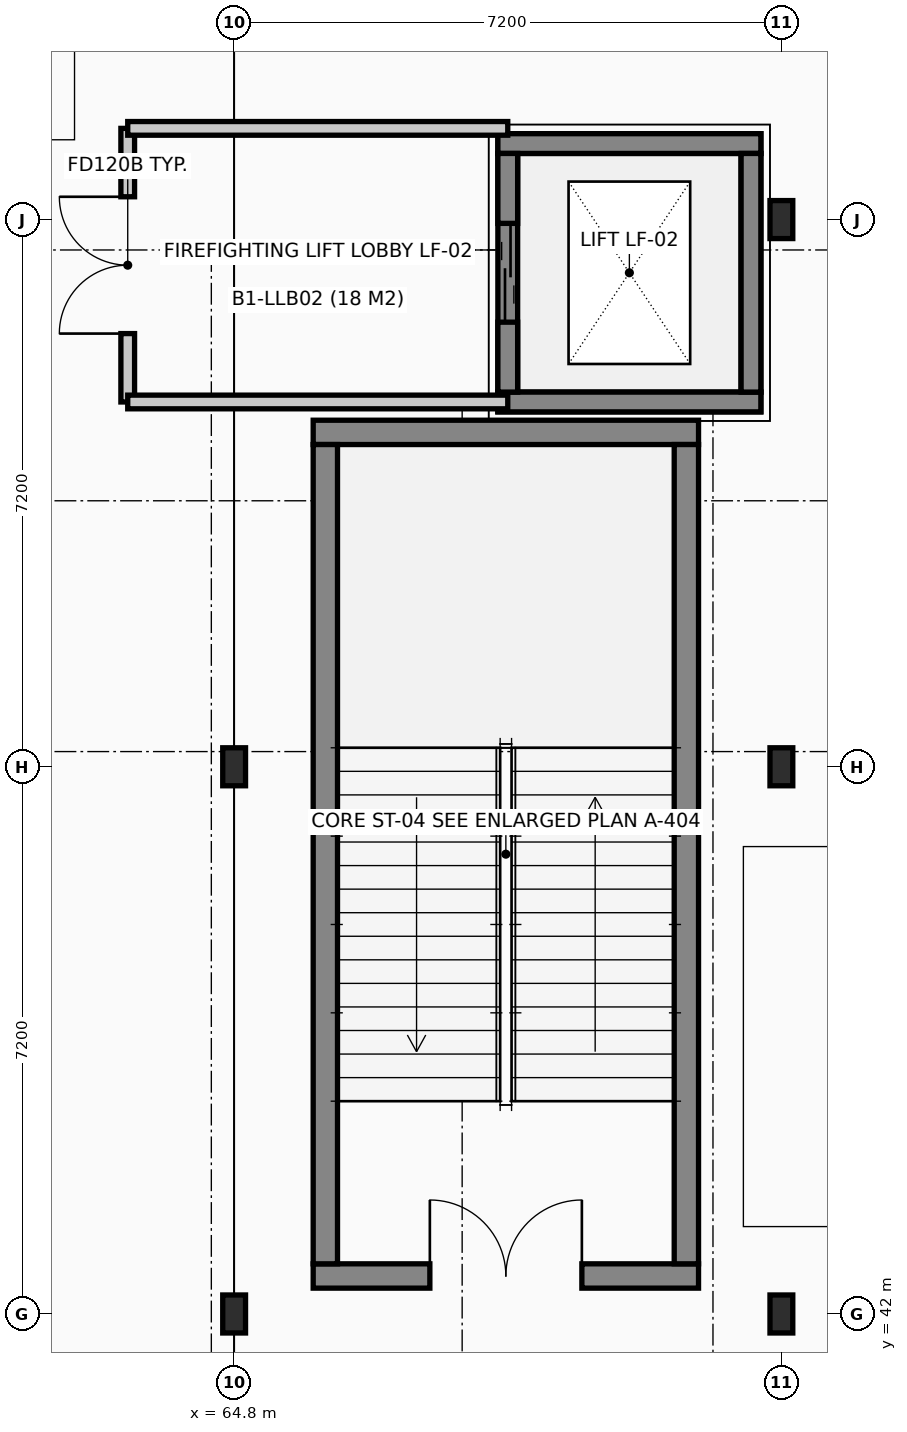
"""IFC4 building model, lengths in metres.
Left out: names, types, materials, properties, quantities, classifications, styles, units other than length and angle.
Written with IfcOpenShell. Run it as: python <this file> out.ifc"""

import sys

from ifc_helpers import new_model, si_unit, direction, frame, frame_2d, origin, origin_2d, place, context, subcontext, project, spatial, rectangle, i_section, extrude, element, fill, save


model = new_model("IFC4")
c1 = context("Model", 3, precision=1e-05, world=origin(), true_north=direction((0.0, 1.0)))
c2 = subcontext(c1, "Body", "Model", "MODEL_VIEW")
j1 = project(units=[si_unit("LENGTHUNIT", "METRE"), si_unit("PLANEANGLEUNIT", "RADIAN")], contexts=[c1])
p1 = place(None, origin())
s1 = spatial("IfcSite", under=j1, at=p1, CompositionType="ELEMENT")
p2 = place(p1, origin())
s2 = spatial("IfcBuilding", under=s1, at=p2, CompositionType="ELEMENT")
p3 = place(p2, frame((0.0, 0.0, -4.8)))
s3 = spatial("IfcBuildingStorey", under=s2, at=p3, CompositionType="ELEMENT", Elevation=-4.8)
for number, where, z_axis, x_axis in (
    (1, (64.8, 42.0, 0.0), (0.0, 0.0, 1.0), (1.0, 0.0, 0.0)),
    (2, (64.8, 49.2, 0.0), (0.0, 0.0, 1.0), (1.0, 0.0, 0.0)),
    (3, (72.0, 42.0, 0.0), (0.0, 0.0, 1.0), (1.0, 0.0, 0.0)),
    (4, (72.0, 49.2, 0.0), (0.0, 0.0, 1.0), (1.0, 0.0, 0.0)),
    (5, (72.0, 56.4, 0.0), (0.0, 0.0, 1.0), (1.0, 0.0, 0.0)),
):
    element("IfcColumn", number, at=place(p3, frame(where, z_axis=z_axis, x_axis=x_axis)), inside=s3, PredefinedType="COLUMN", context=c2, shape_type="SweptSolid", body=[
        extrude(i_section(OverallWidth=0.3, OverallDepth=0.5, WebThickness=0.014, FlangeThickness=0.028, at=origin_2d()), origin(), (0.0, 0.0, 1.0), 4.8),
    ])
p4 = place(p3, frame((65.84, 42.5, 0.0), z_axis=(0.0, 0.0, 1.0), x_axis=(1.0, 0.0, 0.0)))
e6 = element("IfcWall", 6, at=p4, inside=s3, PredefinedType="SHEAR", context=c2, shape_type="SweptSolid", body=[
    extrude(rectangle(XDim=5.07, YDim=0.32, at=frame_2d((2.535, 0.0))), origin(), (0.0, 0.0, 1.0), 4.55),
])
p5 = place(p4, frame((1.535, 0.0, 0.0)))
e7 = element("IfcOpeningElement", 7, at=p5, cuts=e6, PredefinedType="OPENING", context=c2, shape_type="SweptSolid", body=[
    extrude(rectangle(XDim=2.0, YDim=2.15, at=frame_2d((1.0, 1.075))), frame((0.0, 0.17, 0.0), z_axis=(0.0, -1.0, 0.0), x_axis=(1.0, 0.0, 0.0)), (0.0, 0.0, 1.0), 0.34),
])
p6 = place(p3, frame((65.84, 53.6, 0.0), z_axis=(0.0, 0.0, 1.0), x_axis=(1.0, 0.0, 0.0)))
e8 = element("IfcWall", 8, at=p6, inside=s3, PredefinedType="SHEAR", context=c2, shape_type="SweptSolid", body=[
    extrude(rectangle(XDim=5.07, YDim=0.32, at=frame_2d((2.535, 0.0))), origin(), (0.0, 0.0, 1.0), 4.55),
])
for number, where, z_axis, x_axis in (
    (9, (66.0, 42.66, 0.0), (0.0, 0.0, 1.0), (0.0, 1.0, 0.0)),
    (10, (70.75, 42.66, 0.0), (0.0, 0.0, 1.0), (0.0, 1.0, 0.0)),
):
    element("IfcWall", number, at=place(p3, frame(where, z_axis=z_axis, x_axis=x_axis)), inside=s3, PredefinedType="SHEAR", context=c2, shape_type="SweptSolid", body=[
        extrude(rectangle(XDim=10.78, YDim=0.32, at=frame_2d((5.39, 0.0))), origin(), (0.0, 0.0, 1.0), 4.55),
    ])
for number, where, z_axis, x_axis in (
    (11, (68.27, 54.0, -1.5), (0.0, 0.0, 1.0), (1.0, 0.0, 0.0)),
    (12, (68.27, 57.4, -1.5), (0.0, 0.0, 1.0), (1.0, 0.0, 0.0)),
):
    element("IfcWall", number, at=place(p3, frame(where, z_axis=z_axis, x_axis=x_axis)), inside=s3, PredefinedType="SHEAR", context=c2, shape_type="SweptSolid", body=[
        extrude(rectangle(XDim=3.46, YDim=0.26, at=frame_2d((1.73, 0.0))), origin(), (0.0, 0.0, 1.0), 1.5),
    ])
for number, where, z_axis, x_axis in (
    (13, (68.4, 54.13, -1.5), (0.0, 0.0, 1.0), (0.0, 1.0, 0.0)),
    (14, (71.6, 54.13, -1.5), (0.0, 0.0, 1.0), (0.0, 1.0, 0.0)),
):
    element("IfcWall", number, at=place(p3, frame(where, z_axis=z_axis, x_axis=x_axis)), inside=s3, PredefinedType="SHEAR", context=c2, shape_type="SweptSolid", body=[
        extrude(rectangle(XDim=3.14, YDim=0.26, at=frame_2d((1.57, 0.0))), origin(), (0.0, 0.0, 1.0), 1.5),
    ])
for number, where, z_axis, x_axis in (
    (15, (68.27, 54.0, 0.0), (0.0, 0.0, 1.0), (1.0, 0.0, 0.0)),
    (16, (68.27, 57.4, 0.0), (0.0, 0.0, 1.0), (1.0, 0.0, 0.0)),
):
    element("IfcWall", number, at=place(p3, frame(where, z_axis=z_axis, x_axis=x_axis)), inside=s3, PredefinedType="SHEAR", context=c2, shape_type="SweptSolid", body=[
        extrude(rectangle(XDim=3.46, YDim=0.26, at=frame_2d((1.73, 0.0))), origin(), (0.0, 0.0, 1.0), 4.55),
    ])
p7 = place(p3, frame((68.4, 54.13, 0.0), z_axis=(0.0, 0.0, 1.0), x_axis=(0.0, 1.0, 0.0)))
e17 = element("IfcWall", 17, at=p7, inside=s3, PredefinedType="SHEAR", context=c2, shape_type="SweptSolid", body=[
    extrude(rectangle(XDim=3.14, YDim=0.26, at=frame_2d((1.57, 0.0))), origin(), (0.0, 0.0, 1.0), 4.55),
])
p8 = place(p7, frame((0.92, 0.0, 0.0)))
e18 = element("IfcOpeningElement", 18, at=p8, cuts=e17, PredefinedType="OPENING", context=c2, shape_type="SweptSolid", body=[
    extrude(rectangle(XDim=1.3, YDim=2.2, at=frame_2d((0.65, 1.1))), frame((0.0, 0.14, 0.0), z_axis=(0.0, -1.0, 0.0), x_axis=(1.0, 0.0, 0.0)), (0.0, 0.0, 1.0), 0.28),
])
p9 = place(p3, frame((71.6, 54.13, 0.0), z_axis=(0.0, 0.0, 1.0), x_axis=(0.0, 1.0, 0.0)))
e19 = element("IfcWall", 19, at=p9, inside=s3, PredefinedType="SHEAR", context=c2, shape_type="SweptSolid", body=[
    extrude(rectangle(XDim=3.14, YDim=0.26, at=frame_2d((1.57, 0.0))), origin(), (0.0, 0.0, 1.0), 4.55),
])
p10 = place(p3, frame((63.4, 54.0, 0.0), z_axis=(0.0, 0.0, 1.0), x_axis=(0.0, 1.0, 0.0)))
e20 = element("IfcWall", 20, at=p10, inside=s3, PredefinedType="PARTITIONING", context=c2, shape_type="SweptSolid", body=[
    extrude(rectangle(XDim=3.6, YDim=0.18, at=frame_2d((1.8, 0.0))), origin(), (0.0, 0.0, 1.0), 4.535),
])
p11 = place(p10, frame((0.9, 0.0, 0.0)))
e21 = element("IfcOpeningElement", 21, at=p11, cuts=e20, PredefinedType="OPENING", context=c2, shape_type="SweptSolid", body=[
    extrude(rectangle(XDim=1.8, YDim=2.15, at=frame_2d((0.9, 1.075))), frame((0.0, 0.1, 0.0), z_axis=(0.0, -1.0, 0.0), x_axis=(1.0, 0.0, 0.0)), (0.0, 0.0, 1.0), 0.2),
])
for number, where, z_axis, x_axis in (
    (22, (63.4, 54.0, 0.0), (0.0, 0.0, 1.0), (1.0, 0.0, 0.0)),
    (23, (63.4, 57.6, 0.0), (0.0, 0.0, 1.0), (1.0, 0.0, 0.0)),
):
    element("IfcWall", number, at=place(p3, frame(where, z_axis=z_axis, x_axis=x_axis)), inside=s3, PredefinedType="PARTITIONING", context=c2, shape_type="SweptSolid", body=[
        extrude(rectangle(XDim=5.0, YDim=0.18, at=frame_2d((2.5, 0.0))), origin(), (0.0, 0.0, 1.0), 4.535),
    ])
p12 = place(p5, origin())
e24 = element("IfcDoor", 24, at=p12, inside=s3, OperationType="DOUBLE_DOOR_SINGLE_SWING", PredefinedType="DOOR", context=c2, shape_type="SweptSolid", body=[
    extrude(rectangle(XDim=2.0, YDim=2.15, at=frame_2d((1.0, 1.075))), frame((0.0, 0.025, 0.0), z_axis=(0.0, -1.0, 0.0), x_axis=(1.0, 0.0, 0.0)), (0.0, 0.0, 1.0), 0.05),
])
fill(e7, e24)
p13 = place(p8, origin())
e25 = element("IfcDoor", 25, at=p13, inside=s3, OperationType="DOUBLE_DOOR_SLIDING", PredefinedType="DOOR", context=c2, shape_type="SweptSolid", body=[
    extrude(rectangle(XDim=1.3, YDim=2.2, at=frame_2d((0.65, 1.1))), frame((0.0, 0.025, 0.0), z_axis=(0.0, -1.0, 0.0), x_axis=(1.0, 0.0, 0.0)), (0.0, 0.0, 1.0), 0.05),
])
fill(e18, e25)
p14 = place(p11, origin())
e26 = element("IfcDoor", 26, at=p14, inside=s3, OperationType="DOUBLE_DOOR_SINGLE_SWING", PredefinedType="DOOR", context=c2, shape_type="SweptSolid", body=[
    extrude(rectangle(XDim=1.8, YDim=2.15, at=frame_2d((0.9, 1.075))), frame((0.0, 0.025, 0.0), z_axis=(0.0, -1.0, 0.0), x_axis=(1.0, 0.0, 0.0)), (0.0, 0.0, 1.0), 0.05),
])
fill(e21, e26)
save(model, sys.argv[1])
